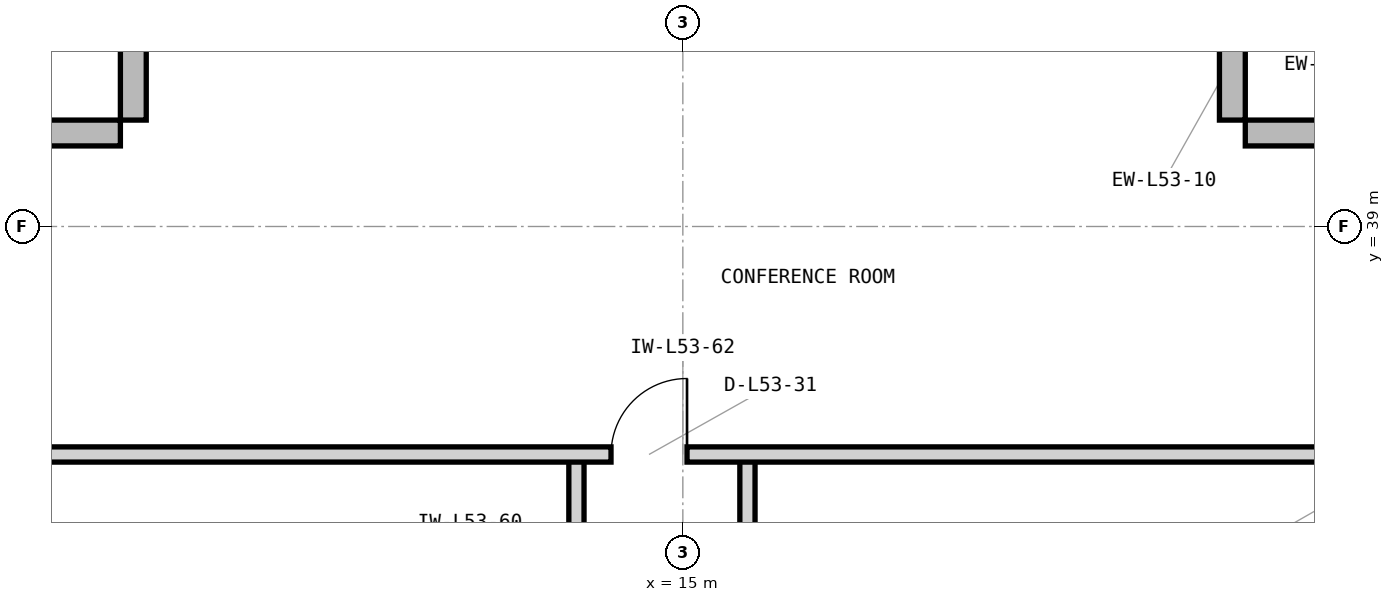
"""IFC4 building model, lengths in metres.
Left out: names, types, materials, properties, quantities, classifications, styles, units other than length and angle.
Written with IfcOpenShell. Run it as: python <this file> out.ifc"""

import sys

from ifc_helpers import new_model, si_unit, direction, frame, frame_2d, origin, place, context, subcontext, project, spatial, rectangle, extrude, element, fill, save


model = new_model("IFC4")
c1 = context("Model", 3, precision=1e-05, world=origin(), true_north=direction((0.0, 1.0)))
c2 = subcontext(c1, "Body", "Model", "MODEL_VIEW")
j1 = project(units=[si_unit("LENGTHUNIT", "METRE"), si_unit("PLANEANGLEUNIT", "RADIAN")], contexts=[c1])
p1 = place(None, origin())
s1 = spatial("IfcSite", under=j1, at=p1, CompositionType="ELEMENT")
p2 = place(p1, origin())
s2 = spatial("IfcBuilding", under=s1, at=p2, CompositionType="ELEMENT")
p3 = place(p2, frame((0.0, 0.0, 219.0)))
s3 = spatial("IfcBuildingStorey", under=s2, at=p3, CompositionType="ELEMENT", Elevation=219.0)
for number, where, z_axis, x_axis in (
    (1, (24.0, 40.23, 0.0), (0.0, 0.0, 1.0), (-1.0, 0.0, 0.0)),
    (2, (22.23, 40.4, 0.0), (0.0, 0.0, 1.0), (0.0, 1.0, 0.0)),
    (3, (7.77, 42.0, 0.0), (0.0, 0.0, 1.0), (0.0, -1.0, 0.0)),
    (4, (7.6, 40.23, 0.0), (0.0, 0.0, 1.0), (-1.0, 0.0, 0.0)),
):
    element("IfcWall", number, at=place(p3, frame(where, z_axis=z_axis, x_axis=x_axis)), inside=s3, PredefinedType="STANDARD", context=c2, shape_type="SweptSolid", body=[
        extrude(rectangle(XDim=1.6, YDim=0.34, at=frame_2d((0.8, 0.0))), origin(), (0.0, 0.0, 1.0), 3.65),
    ])
p4 = place(p3, frame((13.6, 29.18, 0.0), z_axis=(0.0, 0.0, 1.0), x_axis=(0.0, 1.0, 0.0)))
e5 = element("IfcWall", 5, at=p4, inside=s3, PredefinedType="PARTITIONING", context=c2, shape_type="SweptSolid", body=[
    extrude(rectangle(XDim=6.82, YDim=0.2, at=frame_2d((3.41, 0.0))), origin(), (0.0, 0.0, 1.0), 3.64),
])
p5 = place(p4, frame((2.66, 0.0, 0.0)))
e6 = element("IfcOpeningElement", 6, at=p5, cuts=e5, PredefinedType="OPENING", context=c2, shape_type="SweptSolid", body=[
    extrude(rectangle(XDim=1.5, YDim=2.3, at=frame_2d((0.75, 1.15))), frame((0.0, 0.11, 0.0), z_axis=(0.0, -1.0, 0.0), x_axis=(1.0, 0.0, 0.0)), (0.0, 0.0, 1.0), 0.22),
])
p6 = place(p3, frame((15.85, 29.18, 0.0), z_axis=(0.0, 0.0, 1.0), x_axis=(0.0, 1.0, 0.0)))
e7 = element("IfcWall", 7, at=p6, inside=s3, PredefinedType="PARTITIONING", context=c2, shape_type="SweptSolid", body=[
    extrude(rectangle(XDim=6.82, YDim=0.2, at=frame_2d((3.41, 0.0))), origin(), (0.0, 0.0, 1.0), 3.64),
])
p7 = place(p6, frame((2.91, 0.0, 0.0)))
e8 = element("IfcOpeningElement", 8, at=p7, cuts=e7, PredefinedType="OPENING", context=c2, shape_type="SweptSolid", body=[
    extrude(rectangle(XDim=1.0, YDim=2.15, at=frame_2d((0.5, 1.075))), frame((0.0, 0.11, 0.0), z_axis=(0.0, -1.0, 0.0), x_axis=(1.0, 0.0, 0.0)), (0.0, 0.0, 1.0), 0.22),
])
p8 = place(p3, frame((6.18, 36.0, 0.0), z_axis=(0.0, 0.0, 1.0), x_axis=(1.0, 0.0, 0.0)))
e9 = element("IfcWall", 9, at=p8, inside=s3, PredefinedType="PARTITIONING", context=c2, shape_type="SweptSolid", body=[
    extrude(rectangle(XDim=17.64, YDim=0.2, at=frame_2d((8.82, 0.0))), origin(), (0.0, 0.0, 1.0), 3.073),
])
p9 = place(p8, frame((7.875, 0.0, 0.0)))
e10 = element("IfcOpeningElement", 10, at=p9, cuts=e9, PredefinedType="OPENING", context=c2, shape_type="SweptSolid", body=[
    extrude(rectangle(XDim=1.0, YDim=2.15, at=frame_2d((0.5, 1.075))), frame((0.0, 0.11, 0.0), z_axis=(0.0, -1.0, 0.0), x_axis=(1.0, 0.0, 0.0)), (0.0, 0.0, 1.0), 0.22),
])
p10 = place(p9, origin())
e11 = element("IfcDoor", 11, at=p10, inside=s3, OperationType="SINGLE_SWING_RIGHT", PredefinedType="DOOR", context=c2, shape_type="SweptSolid", body=[
    extrude(rectangle(XDim=1.0, YDim=2.15, at=frame_2d((0.5, 1.075))), frame((0.0, 0.025, 0.0), z_axis=(0.0, -1.0, 0.0), x_axis=(1.0, 0.0, 0.0)), (0.0, 0.0, 1.0), 0.05),
])
fill(e10, e11)
save(model, sys.argv[1])
